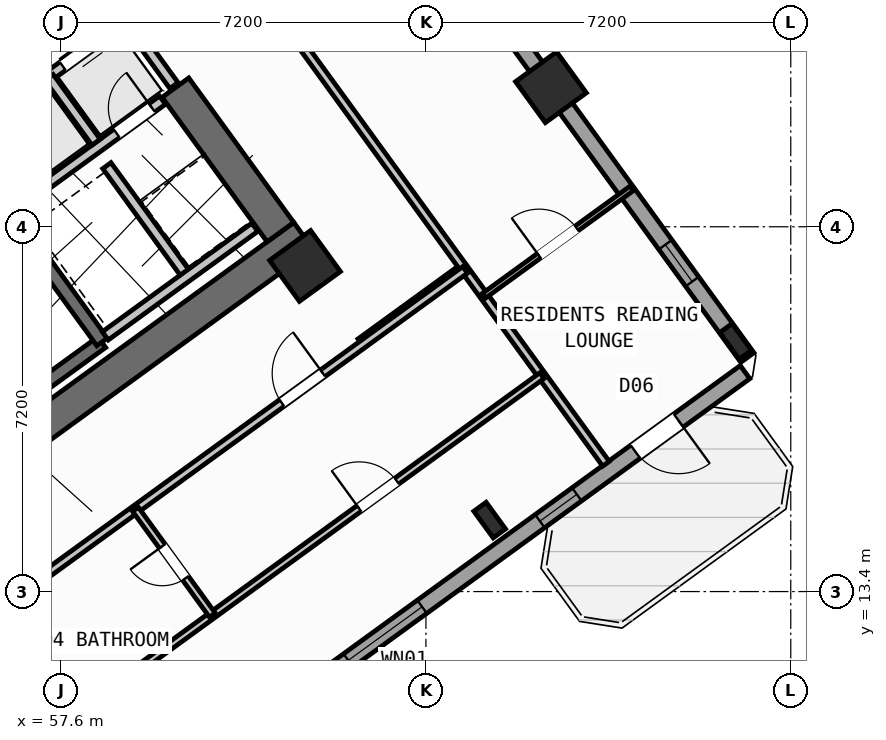
"""IFC4 building model, lengths in metres.
Left out: names, types, materials, properties, quantities, classifications, styles, units other than length and angle.
Written with IfcOpenShell. Run it as: python <this file> out.ifc"""

import sys

from ifc_helpers import new_model, si_unit, direction, frame, frame_2d, origin, origin_2d, place, context, subcontext, project, spatial, rectangle, hollow_rectangle, i_section, extrude, source, transform, mapped, element, fill, save


model = new_model("IFC4")
c1 = context("Model", 3, precision=1e-05, world=origin(), true_north=direction((0.0, 1.0)))
c2 = subcontext(c1, "Body", "Model", "MODEL_VIEW")
j1 = project(units=[si_unit("LENGTHUNIT", "METRE"), si_unit("PLANEANGLEUNIT", "RADIAN")], contexts=[c1])
p1 = place(None, origin())
s1 = spatial("IfcSite", under=j1, at=p1, CompositionType="ELEMENT")
p2 = place(p1, origin())
s2 = spatial("IfcBuilding", under=s1, at=p2, CompositionType="ELEMENT")
p3 = place(p2, frame((0.0, 0.0, 67.2)))
s3 = spatial("IfcBuildingStorey", under=s2, at=p3, CompositionType="ELEMENT", Elevation=67.2)
p4 = place(p3, frame((52.318, 13.11, 0.0), z_axis=(0.0, 0.0, 1.0), x_axis=(0.809019445368, 0.587781878776, 0.0)))
e1 = element("IfcWall", 1, at=p4, inside=s3, PredefinedType="SHEAR", context=c2, shape_type="SweptSolid", body=[
    extrude(rectangle(XDim=12.44, YDim=0.65, at=frame_2d((6.22, 0.0))), origin(), (0.0, 0.0, 1.0), 4.22),
])
p5 = place(p3, frame((61.929, 20.494, 0.0), z_axis=(0.0, 0.0, 1.0), x_axis=(-0.58782982593, 0.808984607855, 0.0)))
e2 = element("IfcWall", 2, at=p5, inside=s3, PredefinedType="SHEAR", context=c2, shape_type="SweptSolid", body=[
    extrude(rectangle(XDim=3.525, YDim=0.65, at=frame_2d((1.762, 0.0))), origin(), (0.0, 0.0, 1.0), 4.22),
])
m1 = source(origin(), c2, "Body", "SweptSolid", [
    extrude(i_section(OverallWidth=0.3, OverallDepth=0.65, WebThickness=0.016, FlangeThickness=0.031, at=origin_2d()), origin(), (0.0, 0.0, 1.0), 4.5),
])
p6 = place(p3, frame((66.058, 14.811, 0.0), z_axis=(0.0, 0.0, 1.0), x_axis=(0.809016994375, 0.587785252292, 0.0)))
e3 = element("IfcColumn", 3, at=p6, inside=s3, PredefinedType="COLUMN", context=c2, shape_type="MappedRepresentation", body=[
    mapped(m1, transform((0.0, 0.0, 0.0), scale=1.0)),
])
m2 = source(origin(), c2, "Body", "SweptSolid", [
    extrude(hollow_rectangle(XDim=1.0, YDim=1.0, WallThickness=0.04, at=origin_2d()), origin(), (0.0, 0.0, 1.0), 4.5),
])
p7 = place(p3, frame((62.414, 19.827, 0.0), z_axis=(0.0, 0.0, 1.0), x_axis=(0.809016994375, 0.587785252292, 0.0)))
e4 = element("IfcColumn", 4, at=p7, inside=s3, PredefinedType="COLUMN", context=c2, shape_type="MappedRepresentation", body=[
    mapped(m2, transform((0.0, 0.0, 0.0), scale=1.0)),
])
p8 = place(p3, frame((70.912, 18.338, 0.0), z_axis=(0.0, 0.0, 1.0), x_axis=(0.809016994375, 0.587785252292, 0.0)))
e5 = element("IfcColumn", 5, at=p8, inside=s3, PredefinedType="COLUMN", context=c2, shape_type="MappedRepresentation", body=[
    mapped(m1, transform((0.0, 0.0, 0.0), scale=1.0)),
])
p9 = place(p3, frame((67.268, 23.354, 0.0), z_axis=(0.0, 0.0, 1.0), x_axis=(0.809016994375, 0.587785252292, 0.0)))
e6 = element("IfcColumn", 6, at=p9, inside=s3, PredefinedType="COLUMN", context=c2, shape_type="MappedRepresentation", body=[
    mapped(m2, transform((0.0, 0.0, 0.0), scale=1.0)),
])
p10 = place(p3, frame((58.455, 35.484, 0.0), z_axis=(0.0, 0.0, 1.0), x_axis=(0.587783625747, -0.809018176127, 0.0)))
e7 = element("IfcWall", 7, at=p10, inside=s3, PredefinedType="STANDARD", context=c2, shape_type="SweptSolid", body=[
    extrude(rectangle(XDim=21.587, YDim=0.32, at=frame_2d((10.794, 0.0))), origin(), (0.0, 0.0, 1.0), 2.395),
])
p11 = place(p10, frame((2.194, 0.0, 1.0)))
e8 = element("IfcOpeningElement", 8, at=p11, cuts=e7, PredefinedType="OPENING", context=c2, shape_type="SweptSolid", body=[
    extrude(rectangle(XDim=0.9, YDim=1.25, at=frame_2d((0.45, 0.625))), frame((0.0, 0.17, 0.0), z_axis=(0.0, -1.0, 0.0), x_axis=(1.0, 0.0, 0.0)), (0.0, 0.0, 1.0), 0.34),
])
p12 = place(p10, frame((4.994, 0.0, 1.0)))
e9 = element("IfcOpeningElement", 9, at=p12, cuts=e7, PredefinedType="OPENING", context=c2, shape_type="SweptSolid", body=[
    extrude(rectangle(XDim=0.9, YDim=1.25, at=frame_2d((0.45, 0.625))), frame((0.0, 0.17, 0.0), z_axis=(0.0, -1.0, 0.0), x_axis=(1.0, 0.0, 0.0)), (0.0, 0.0, 1.0), 0.34),
])
p13 = place(p10, frame((12.384, 0.0, 1.0)))
e10 = element("IfcOpeningElement", 10, at=p13, cuts=e7, PredefinedType="OPENING", context=c2, shape_type="SweptSolid", body=[
    extrude(rectangle(XDim=0.9, YDim=1.25, at=frame_2d((0.45, 0.625))), frame((0.0, 0.17, 0.0), z_axis=(0.0, -1.0, 0.0), x_axis=(1.0, 0.0, 0.0)), (0.0, 0.0, 1.0), 0.34),
])
p14 = place(p10, frame((18.835, 0.0, 1.0)))
e11 = element("IfcOpeningElement", 11, at=p14, cuts=e7, PredefinedType="OPENING", context=c2, shape_type="SweptSolid", body=[
    extrude(rectangle(XDim=0.9, YDim=1.25, at=frame_2d((0.45, 0.625))), frame((0.0, 0.17, 0.0), z_axis=(0.0, -1.0, 0.0), x_axis=(1.0, 0.0, 0.0)), (0.0, 0.0, 1.0), 0.34),
])
p15 = place(p3, frame((71.098, 17.731, 0.0), z_axis=(0.0, 0.0, 1.0), x_axis=(-0.809021120468, -0.587779573171, 0.0)))
e12 = element("IfcWall", 12, at=p15, inside=s3, PredefinedType="STANDARD", context=c2, shape_type="SweptSolid", body=[
    extrude(rectangle(XDim=17.588, YDim=0.32, at=frame_2d((8.794, 0.0))), origin(), (0.0, 0.0, 1.0), 4.22),
])
p16 = place(p15, frame((1.624, 0.0, 0.0)))
e13 = element("IfcOpeningElement", 13, at=p16, cuts=e12, PredefinedType="OPENING", context=c2, shape_type="SweptSolid", body=[
    extrude(rectangle(XDim=1.05, YDim=2.15, at=frame_2d((0.525, 1.075))), frame((0.0, 0.17, 0.0), z_axis=(0.0, -1.0, 0.0), x_axis=(1.0, 0.0, 0.0)), (0.0, 0.0, 1.0), 0.34),
])
p17 = place(p15, frame((4.104, 0.0, 1.0)))
e14 = element("IfcOpeningElement", 14, at=p17, cuts=e12, PredefinedType="OPENING", context=c2, shape_type="SweptSolid", body=[
    extrude(rectangle(XDim=0.9, YDim=1.25, at=frame_2d((0.45, 0.625))), frame((0.0, 0.17, 0.0), z_axis=(0.0, -1.0, 0.0), x_axis=(1.0, 0.0, 0.0)), (0.0, 0.0, 1.0), 0.34),
])
p18 = place(p15, frame((7.879, 0.0, 0.85)))
e15 = element("IfcOpeningElement", 15, at=p18, cuts=e12, PredefinedType="OPENING", context=c2, shape_type="SweptSolid", body=[
    extrude(rectangle(XDim=1.8, YDim=1.5, at=frame_2d((0.9, 0.75))), frame((0.0, 0.17, 0.0), z_axis=(0.0, -1.0, 0.0), x_axis=(1.0, 0.0, 0.0)), (0.0, 0.0, 1.0), 0.34),
])
p19 = place(p15, frame((12.849, 0.0, 0.85)))
e16 = element("IfcOpeningElement", 16, at=p19, cuts=e12, PredefinedType="OPENING", context=c2, shape_type="SweptSolid", body=[
    extrude(rectangle(XDim=1.8, YDim=1.5, at=frame_2d((0.9, 0.75))), frame((0.0, 0.17, 0.0), z_axis=(0.0, -1.0, 0.0), x_axis=(1.0, 0.0, 0.0)), (0.0, 0.0, 1.0), 0.34),
])
p20 = place(p3, frame((52.472, 14.013, 0.0), z_axis=(0.0, 0.0, 1.0), x_axis=(0.809028366311, 0.587769599847, 0.0)))
e17 = element("IfcWall", 17, at=p20, inside=s3, PredefinedType="SHEAR", context=c2, shape_type="SweptSolid", body=[
    extrude(rectangle(XDim=7.33, YDim=0.26, at=frame_2d((3.665, 0.0))), origin(), (0.0, 0.0, 1.0), 4.22),
])
p21 = place(p3, frame((58.41, 18.327, 0.0), z_axis=(0.0, 0.0, 1.0), x_axis=(-0.58776738483, 0.809029975545, 0.0)))
e18 = element("IfcWall", 18, at=p21, inside=s3, PredefinedType="SHEAR", context=c2, shape_type="SweptSolid", body=[
    extrude(rectangle(XDim=3.16, YDim=0.26, at=frame_2d((1.58, 0.0))), origin(), (0.0, 0.0, 1.0), 4.22),
])
p22 = place(p3, frame((56.553, 20.884, 0.0), z_axis=(0.0, 0.0, 1.0), x_axis=(0.809035789462, 0.587759382205, 0.0)))
e19 = element("IfcWall", 19, at=p22, inside=s3, PredefinedType="STANDARD", context=c2, shape_type="SweptSolid", body=[
    extrude(rectangle(XDim=3.768, YDim=0.2, at=frame_2d((1.884, 0.0))), origin(), (0.0, 0.0, 1.0), 4.21),
])
p23 = place(p22, frame((2.65, 0.0, 0.0)))
e20 = element("IfcOpeningElement", 20, at=p23, cuts=e19, PredefinedType="OPENING", context=c2, shape_type="SweptSolid", body=[
    extrude(rectangle(XDim=0.86, YDim=2.05, at=frame_2d((0.43, 1.025))), frame((0.0, 0.11, 0.0), z_axis=(0.0, -1.0, 0.0), x_axis=(1.0, 0.0, 0.0)), (0.0, 0.0, 1.0), 0.22),
])
p24 = place(p3, frame((54.421, 21.436, 0.0), z_axis=(0.0, 0.0, 1.0), x_axis=(0.809013710463, 0.587789772183, 0.0)))
e21 = element("IfcWall", 21, at=p24, inside=s3, PredefinedType="STANDARD", context=c2, shape_type="SweptSolid", body=[
    extrude(rectangle(XDim=5.36, YDim=0.2, at=frame_2d((2.68, 0.0))), origin(), (0.0, 0.0, 1.0), 4.21),
])
p25 = place(p24, frame((0.37, 0.0, 0.0)))
e22 = element("IfcOpeningElement", 22, at=p25, cuts=e21, PredefinedType="OPENING", context=c2, shape_type="SweptSolid", body=[
    extrude(rectangle(XDim=1.1, YDim=2.15, at=frame_2d((0.55, 1.075))), frame((0.0, 0.11, 0.0), z_axis=(0.0, -1.0, 0.0), x_axis=(1.0, 0.0, 0.0)), (0.0, 0.0, 1.0), 0.22),
])
p26 = place(p24, frame((2.17, 0.0, 0.0)))
e23 = element("IfcOpeningElement", 23, at=p26, cuts=e21, PredefinedType="OPENING", context=c2, shape_type="SweptSolid", body=[
    extrude(rectangle(XDim=1.1, YDim=2.15, at=frame_2d((0.55, 1.075))), frame((0.0, 0.11, 0.0), z_axis=(0.0, -1.0, 0.0), x_axis=(1.0, 0.0, 0.0)), (0.0, 0.0, 1.0), 0.22),
])
p27 = place(p24, frame((3.97, 0.0, 0.0)))
e24 = element("IfcOpeningElement", 24, at=p27, cuts=e21, PredefinedType="OPENING", context=c2, shape_type="SweptSolid", body=[
    extrude(rectangle(XDim=1.1, YDim=2.15, at=frame_2d((0.55, 1.075))), frame((0.0, 0.11, 0.0), z_axis=(0.0, -1.0, 0.0), x_axis=(1.0, 0.0, 0.0)), (0.0, 0.0, 1.0), 0.22),
])
p28 = place(p3, frame((58.29, 22.27, 0.0), z_axis=(0.0, 0.0, 1.0), x_axis=(-0.587840865826, 0.808976585857, 0.0)))
e25 = element("IfcWall", 25, at=p28, inside=s3, PredefinedType="STANDARD", context=c2, shape_type="SweptSolid", body=[
    extrude(rectangle(XDim=1.58, YDim=0.2, at=frame_2d((0.79, 0.0))), origin(), (0.0, 0.0, 1.0), 4.21),
])
p29 = place(p3, frame((60.067, 19.655, 0.0), z_axis=(0.0, 0.0, 1.0), x_axis=(-0.587800520745, 0.809005900975, 0.0)))
e26 = element("IfcWall", 26, at=p29, inside=s3, PredefinedType="STANDARD", context=c2, shape_type="SweptSolid", body=[
    extrude(rectangle(XDim=2.66, YDim=0.2, at=frame_2d((1.33, 0.0))), origin(), (0.0, 0.0, 1.0), 4.21),
])
p30 = place(p3, frame((58.472, 18.447, 0.0), z_axis=(0.0, 0.0, 1.0), x_axis=(0.809022487728, 0.587777691266, 0.0)))
e27 = element("IfcWall", 27, at=p30, inside=s3, PredefinedType="STANDARD", context=c2, shape_type="SweptSolid", body=[
    extrude(rectangle(XDim=3.648, YDim=0.2, at=frame_2d((1.824, 0.0))), origin(), (0.0, 0.0, 1.0), 4.21),
])
p31 = place(p3, frame((53.425, 22.468, 0.0), z_axis=(0.0, 0.0, 1.0), x_axis=(0.80902705128, 0.587771409902, 0.0)))
e28 = element("IfcWall", 28, at=p31, inside=s3, PredefinedType="STANDARD", context=c2, shape_type="SweptSolid", body=[
    extrude(rectangle(XDim=5.368, YDim=0.2, at=frame_2d((2.684, 0.0))), origin(), (0.0, 0.0, 1.0), 4.21),
])
p32 = place(p31, frame((4.28, 0.0, 0.0)))
e29 = element("IfcOpeningElement", 29, at=p32, cuts=e28, PredefinedType="OPENING", context=c2, shape_type="SweptSolid", body=[
    extrude(rectangle(XDim=0.86, YDim=2.05, at=frame_2d((0.43, 1.025))), frame((0.0, 0.11, 0.0), z_axis=(0.0, -1.0, 0.0), x_axis=(1.0, 0.0, 0.0)), (0.0, 0.0, 1.0), 0.22),
])
p33 = place(p31, frame((0.35, 0.0, 0.0)))
e30 = element("IfcOpeningElement", 30, at=p33, cuts=e28, PredefinedType="OPENING", context=c2, shape_type="SweptSolid", body=[
    extrude(rectangle(XDim=0.86, YDim=2.05, at=frame_2d((0.43, 1.025))), frame((0.0, 0.11, 0.0), z_axis=(0.0, -1.0, 0.0), x_axis=(1.0, 0.0, 0.0)), (0.0, 0.0, 1.0), 0.22),
])
p34 = place(p3, frame((59.827, 23.386, 0.0), z_axis=(0.0, 0.0, 1.0), x_axis=(-0.587803840107, 0.809003489211, 0.0)))
e31 = element("IfcWall", 31, at=p34, inside=s3, PredefinedType="STANDARD", context=c2, shape_type="SweptSolid", body=[
    extrude(rectangle(XDim=2.96, YDim=0.2, at=frame_2d((1.48, 0.0))), origin(), (0.0, 0.0, 1.0), 2.395),
])
p35 = place(p34, frame((1.68, 0.0, 0.0)))
e32 = element("IfcOpeningElement", 32, at=p35, cuts=e31, PredefinedType="OPENING", context=c2, shape_type="SweptSolid", body=[
    extrude(rectangle(XDim=1.0, YDim=2.1, at=frame_2d((0.5, 1.05))), frame((0.0, 0.11, 0.0), z_axis=(0.0, -1.0, 0.0), x_axis=(1.0, 0.0, 0.0)), (0.0, 0.0, 1.0), 0.22),
])
p36 = place(p3, frame((63.507, 18.322, 0.0), z_axis=(0.0, 0.0, 1.0), x_axis=(0.809034604122, 0.587761013791, 0.0)))
e33 = element("IfcWall", 33, at=p36, inside=s3, PredefinedType="PARTITIONING", context=c2, shape_type="SweptSolid", body=[
    extrude(rectangle(XDim=2.51, YDim=0.16, at=frame_2d((1.255, 0.0))), origin(), (0.0, 0.0, 1.0), 4.21),
])
p37 = place(p3, frame((68.353, 15.922, 0.0), z_axis=(0.0, 0.0, 1.0), x_axis=(-0.587783168305, 0.809018508476, 0.0)))
e34 = element("IfcWall", 34, at=p37, inside=s3, PredefinedType="PARTITIONING", context=c2, shape_type="SweptSolid", body=[
    extrude(rectangle(XDim=10.65, YDim=0.16, at=frame_2d((5.325, 0.0))), origin(), (0.0, 0.0, 1.0), 4.21),
])
p38 = place(p3, frame((65.944, 19.238, 0.0), z_axis=(0.0, 0.0, 1.0), x_axis=(0.809013833588, 0.587789602718, 0.0)))
e35 = element("IfcWall", 35, at=p38, inside=s3, PredefinedType="PARTITIONING", context=c2, shape_type="SweptSolid", body=[
    extrude(rectangle(XDim=3.61, YDim=0.11, at=frame_2d((1.805, 0.0))), origin(), (0.0, 0.0, 1.0), 4.21),
])
p39 = place(p38, frame((1.345, 0.0, 0.0)))
e36 = element("IfcOpeningElement", 36, at=p39, cuts=e35, PredefinedType="OPENING", context=c2, shape_type="SweptSolid", body=[
    extrude(rectangle(XDim=0.92, YDim=2.08, at=frame_2d((0.46, 1.04))), frame((0.0, 0.065, 0.0), z_axis=(0.0, -1.0, 0.0), x_axis=(1.0, 0.0, 0.0)), (0.0, 0.0, 1.0), 0.13),
])
p40 = place(p3, frame((53.705, 11.126, 0.0), z_axis=(0.0, 0.0, 1.0), x_axis=(0.809014504436, 0.587788679384, 0.0)))
e37 = element("IfcWall", 37, at=p40, inside=s3, PredefinedType="PARTITIONING", context=c2, shape_type="SweptSolid", body=[
    extrude(rectangle(XDim=14.67, YDim=0.16, at=frame_2d((7.335, 0.0))), origin(), (0.0, 0.0, 1.0), 4.21),
])
p41 = place(p40, frame((10.2, 0.0, 0.0)))
e38 = element("IfcOpeningElement", 38, at=p41, cuts=e37, PredefinedType="OPENING", context=c2, shape_type="SweptSolid", body=[
    extrude(rectangle(XDim=1.0, YDim=2.1, at=frame_2d((0.5, 1.05))), frame((0.0, 0.09, 0.0), z_axis=(0.0, -1.0, 0.0), x_axis=(1.0, 0.0, 0.0)), (0.0, 0.0, 1.0), 0.18),
])
p42 = place(p3, frame((57.747, 7.586, 0.0), z_axis=(0.0, 0.0, 1.0), x_axis=(-0.587784893399, 0.809017255126, 0.0)))
e39 = element("IfcWall", 39, at=p42, inside=s3, PredefinedType="PARTITIONING", context=c2, shape_type="SweptSolid", body=[
    extrude(rectangle(XDim=5.48, YDim=0.16, at=frame_2d((2.74, 0.0))), origin(), (0.0, 0.0, 1.0), 4.21),
])
p43 = place(p3, frame((56.249, 9.785, 0.0), z_axis=(0.0, 0.0, 1.0), x_axis=(0.809011747655, 0.587792473715, 0.0)))
e40 = element("IfcWall", 40, at=p43, inside=s3, PredefinedType="PLUMBINGWALL", context=c2, shape_type="SweptSolid", body=[
    extrude(rectangle(XDim=13.4, YDim=0.14, at=frame_2d((6.7, 0.0))), origin(), (0.0, 0.0, 1.0), 4.21),
])
p44 = place(p43, frame((8.94, 0.0, 0.0)))
e41 = element("IfcOpeningElement", 41, at=p44, cuts=e40, PredefinedType="OPENING", context=c2, shape_type="SweptSolid", body=[
    extrude(rectangle(XDim=0.92, YDim=2.08, at=frame_2d((0.46, 1.04))), frame((0.0, 0.08, 0.0), z_axis=(0.0, -1.0, 0.0), x_axis=(1.0, 0.0, 0.0)), (0.0, 0.0, 1.0), 0.16),
])
p45 = place(p3, frame((60.585, 12.936, 0.0), z_axis=(0.0, 0.0, 1.0), x_axis=(-0.587772116736, 0.809026537752, 0.0)))
e42 = element("IfcWall", 42, at=p45, inside=s3, PredefinedType="PLUMBINGWALL", context=c2, shape_type="SweptSolid", body=[
    extrude(rectangle(XDim=2.58, YDim=0.14, at=frame_2d((1.29, 0.0))), origin(), (0.0, 0.0, 1.0), 4.21),
])
p46 = place(p45, frame((0.9, 0.0, 0.0)))
e43 = element("IfcOpeningElement", 43, at=p46, cuts=e42, PredefinedType="OPENING", context=c2, shape_type="SweptSolid", body=[
    extrude(rectangle(XDim=0.78, YDim=2.05, at=frame_2d((0.39, 1.025))), frame((0.0, 0.08, 0.0), z_axis=(0.0, -1.0, 0.0), x_axis=(1.0, 0.0, 0.0)), (0.0, 0.0, 1.0), 0.16),
])
m3 = source(origin(), c2, "Body", "SweptSolid", [
    extrude(rectangle(XDim=1.05, YDim=2.15, at=frame_2d((0.525, 1.075))), frame((0.0, 0.025, 0.0), z_axis=(0.0, -1.0, 0.0), x_axis=(1.0, 0.0, 0.0)), (0.0, 0.0, 1.0), 0.05),
])
p47 = place(p16, origin())
e44 = element("IfcDoor", 44, at=p47, inside=s3, OperationType="SINGLE_SWING_LEFT", PredefinedType="DOOR", context=c2, shape_type="MappedRepresentation", body=[
    mapped(m3, transform((0.0, 0.0, 0.0), scale=1.0)),
])
fill(e13, e44)
m4 = source(origin(), c2, "Body", "SweptSolid", [
    extrude(rectangle(XDim=0.9, YDim=1.25, at=frame_2d((0.45, 0.625))), frame((0.0, 0.03, 0.0), z_axis=(0.0, -1.0, 0.0), x_axis=(1.0, 0.0, 0.0)), (0.0, 0.0, 1.0), 0.06),
])
p48 = place(p14, origin())
e45 = element("IfcWindow", 45, at=p48, inside=s3, PartitioningType="SINGLE_PANEL", PredefinedType="WINDOW", context=c2, shape_type="MappedRepresentation", body=[
    mapped(m4, transform((0.0, 0.0, 0.0), scale=1.0)),
])
fill(e11, e45)
p49 = place(p17, origin())
e46 = element("IfcWindow", 46, at=p49, inside=s3, PartitioningType="SINGLE_PANEL", PredefinedType="WINDOW", context=c2, shape_type="MappedRepresentation", body=[
    mapped(m4, transform((0.0, 0.0, 0.0), scale=1.0)),
])
fill(e14, e46)
m5 = source(origin(), c2, "Body", "SweptSolid", [
    extrude(rectangle(XDim=1.8, YDim=1.5, at=frame_2d((0.9, 0.75))), frame((0.0, 0.03, 0.0), z_axis=(0.0, -1.0, 0.0), x_axis=(1.0, 0.0, 0.0)), (0.0, 0.0, 1.0), 0.06),
])
p50 = place(p18, origin())
e47 = element("IfcWindow", 47, at=p50, inside=s3, PartitioningType="SINGLE_PANEL", PredefinedType="WINDOW", context=c2, shape_type="MappedRepresentation", body=[
    mapped(m5, transform((0.0, 0.0, 0.0), scale=1.0)),
])
fill(e15, e47)
m6 = source(origin(), c2, "Body", "SweptSolid", [
    extrude(rectangle(XDim=1.1, YDim=2.15, at=frame_2d((0.55, 1.075))), frame((0.0, 0.025, 0.0), z_axis=(0.0, -1.0, 0.0), x_axis=(1.0, 0.0, 0.0)), (0.0, 0.0, 1.0), 0.05),
])
p51 = place(p27, origin())
e48 = element("IfcDoor", 48, at=p51, inside=s3, OperationType="DOUBLE_DOOR_SLIDING", PredefinedType="DOOR", context=c2, shape_type="MappedRepresentation", body=[
    mapped(m6, transform((0.0, 0.0, 0.0), scale=1.0)),
])
fill(e24, e48)
m7 = source(origin(), c2, "Body", "SweptSolid", [
    extrude(rectangle(XDim=0.86, YDim=2.05, at=frame_2d((0.43, 1.025))), frame((0.0, 0.025, 0.0), z_axis=(0.0, -1.0, 0.0), x_axis=(1.0, 0.0, 0.0)), (0.0, 0.0, 1.0), 0.05),
])
p52 = place(p23, origin())
e49 = element("IfcDoor", 49, at=p52, inside=s3, OperationType="SINGLE_SWING_RIGHT", PredefinedType="DOOR", context=c2, shape_type="MappedRepresentation", body=[
    mapped(m7, transform((0.0, 0.0, 0.0), scale=1.0)),
])
fill(e20, e49)
m8 = source(origin(), c2, "Body", "SweptSolid", [
    extrude(rectangle(XDim=0.92, YDim=2.08, at=frame_2d((0.46, 1.04))), frame((0.0, 0.025, 0.0), z_axis=(0.0, -1.0, 0.0), x_axis=(1.0, 0.0, 0.0)), (0.0, 0.0, 1.0), 0.05),
])
p53 = place(p39, origin())
e50 = element("IfcDoor", 50, at=p53, inside=s3, OperationType="SINGLE_SWING_LEFT", PredefinedType="DOOR", context=c2, shape_type="MappedRepresentation", body=[
    mapped(m8, transform((0.0, 0.0, 0.0), scale=1.0)),
])
fill(e36, e50)
m9 = source(origin(), c2, "Body", "SweptSolid", [
    extrude(rectangle(XDim=1.0, YDim=2.1, at=frame_2d((0.5, 1.05))), frame((0.0, 0.025, 0.0), z_axis=(0.0, -1.0, 0.0), x_axis=(1.0, 0.0, 0.0)), (0.0, 0.0, 1.0), 0.05),
])
p54 = place(p41, origin())
e51 = element("IfcDoor", 51, at=p54, inside=s3, OperationType="SINGLE_SWING_RIGHT", PredefinedType="DOOR", context=c2, shape_type="MappedRepresentation", body=[
    mapped(m9, transform((0.0, 0.0, 0.0), scale=1.0)),
])
fill(e38, e51)
p55 = place(p44, origin())
e52 = element("IfcDoor", 52, at=p55, inside=s3, OperationType="SINGLE_SWING_LEFT", PredefinedType="DOOR", context=c2, shape_type="MappedRepresentation", body=[
    mapped(m8, transform((0.0, 0.0, 0.0), scale=1.0)),
])
fill(e41, e52)
m10 = source(origin(), c2, "Body", "SweptSolid", [
    extrude(rectangle(XDim=0.78, YDim=2.05, at=frame_2d((0.39, 1.025))), frame((0.0, 0.025, 0.0), z_axis=(0.0, -1.0, 0.0), x_axis=(1.0, 0.0, 0.0)), (0.0, 0.0, 1.0), 0.05),
])
p56 = place(p46, origin())
e53 = element("IfcDoor", 53, at=p56, inside=s3, OperationType="SINGLE_SWING_RIGHT", PredefinedType="DOOR", context=c2, shape_type="MappedRepresentation", body=[
    mapped(m10, transform((0.0, 0.0, 0.0), scale=1.0)),
])
fill(e43, e53)
save(model, sys.argv[1])
